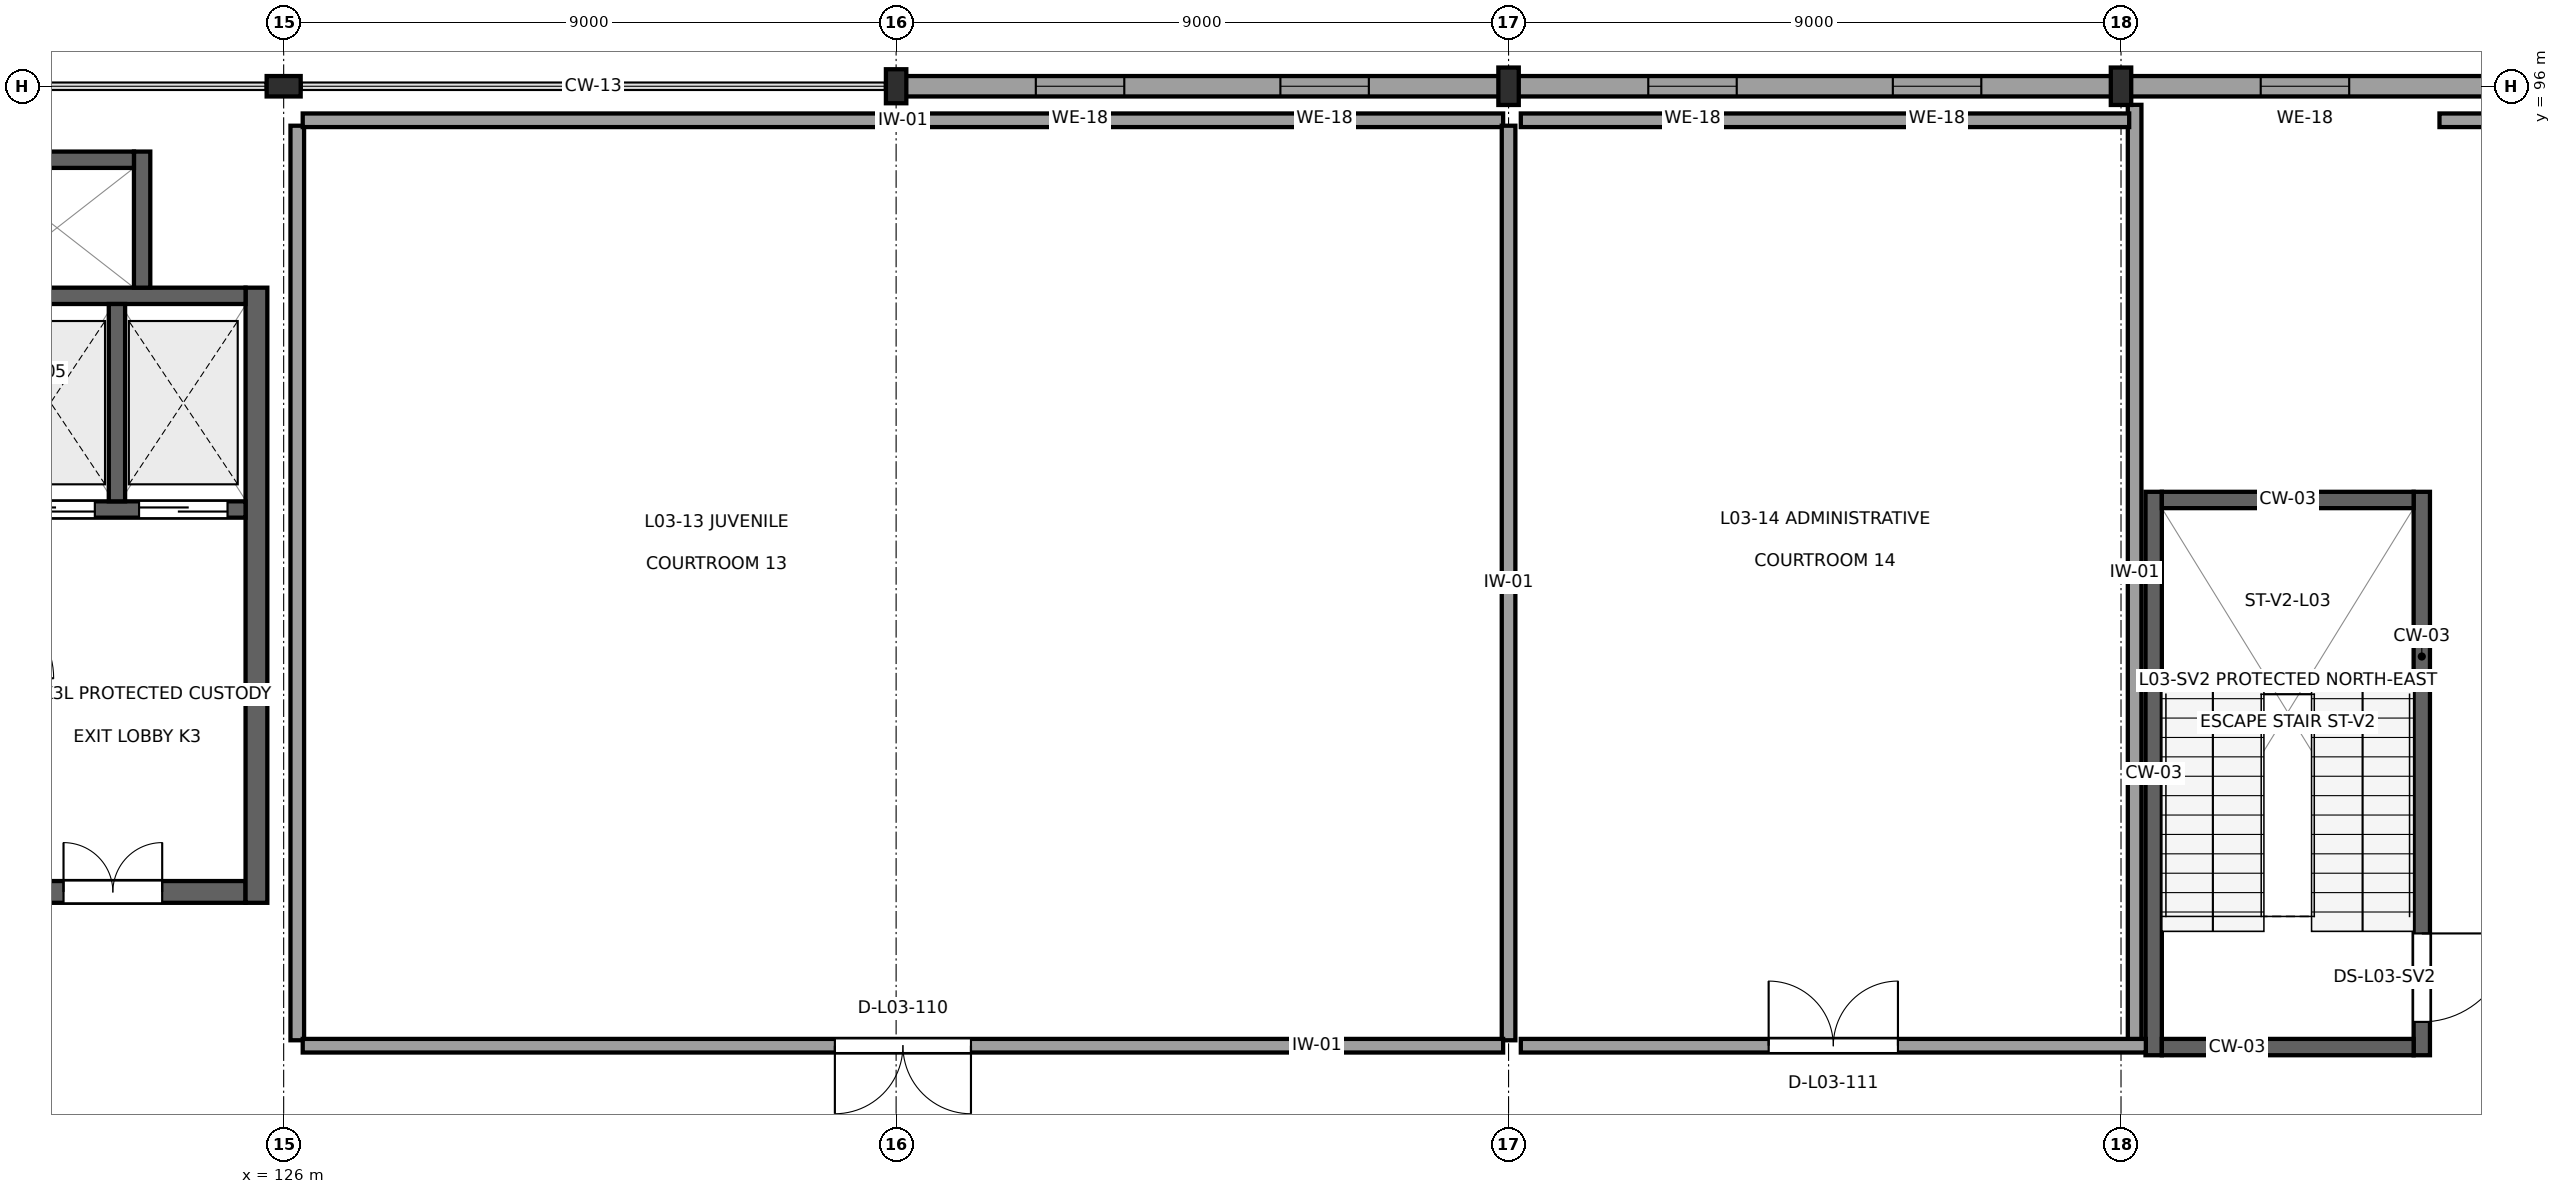
"""IFC4 building model, lengths in metres.
Left out: names, types, materials, properties, quantities, classifications, styles, units other than length and angle.
Written with IfcOpenShell. Run it as: python <this file> out.ifc"""

import sys

from ifc_helpers import new_model, si_unit, direction, frame, frame_2d, origin, origin_2d, place, context, subcontext, project, spatial, rectangle, i_section, extrude, element, fill, save


model = new_model("IFC4")
c1 = context("Model", 3, precision=1e-05, world=origin(), true_north=direction((0.0, 1.0)))
c2 = subcontext(c1, "Body", "Model", "MODEL_VIEW")
j1 = project(units=[si_unit("LENGTHUNIT", "METRE"), si_unit("PLANEANGLEUNIT", "RADIAN")], contexts=[c1])
p1 = place(None, origin())
s1 = spatial("IfcSite", under=j1, at=p1, CompositionType="ELEMENT")
p2 = place(p1, origin())
s2 = spatial("IfcBuilding", under=s1, at=p2, CompositionType="ELEMENT")
p3 = place(p2, frame((0.0, 0.0, 14.4)))
s3 = spatial("IfcBuildingStorey", under=s2, at=p3, CompositionType="ELEMENT", Elevation=14.4)
for number, where, z_axis, x_axis in (
    (1, (126.0, 96.0, 0.0), (0.0, 0.0, 1.0), (0.0, 1.0, 0.0)),
    (2, (135.0, 96.0, 0.0), (0.0, 0.0, 1.0), (1.0, 0.0, 0.0)),
):
    element("IfcColumn", number, at=place(p3, frame(where, z_axis=z_axis, x_axis=x_axis)), inside=s3, PredefinedType="COLUMN", context=c2, shape_type="SweptSolid", body=[
        extrude(i_section(OverallWidth=0.3, OverallDepth=0.5, WebThickness=0.014, FlangeThickness=0.028, at=origin_2d()), origin(), (0.0, 0.0, 1.0), 4.5),
    ])
for number, where, z_axis, x_axis in (
    (3, (144.0, 96.0, 0.0), (0.0, 0.0, 1.0), (1.0, 0.0, 0.0)),
    (4, (153.0, 96.0, 0.0), (0.0, 0.0, 1.0), (1.0, 0.0, 0.0)),
):
    element("IfcColumn", number, at=place(p3, frame(where, z_axis=z_axis, x_axis=x_axis)), inside=s3, PredefinedType="COLUMN", context=c2, shape_type="SweptSolid", body=[
        extrude(i_section(OverallWidth=0.3, OverallDepth=0.55, WebThickness=0.015, FlangeThickness=0.029, at=origin_2d()), origin(), (0.0, 0.0, 1.0), 4.5),
    ])
p4 = place(p3, frame((161.992, 96.0, 0.0), z_axis=(0.0, 0.0, 1.0), x_axis=(-1.0, 0.0, 0.0)))
e5 = element("IfcWall", 5, at=p4, inside=s3, PredefinedType="SOLIDWALL", context=c2, shape_type="SweptSolid", body=[
    extrude(rectangle(XDim=8.984, YDim=0.3, at=frame_2d((4.492, 0.0))), origin(), (0.0, 0.0, 1.0), 3.187),
])
p5 = place(p4, frame((2.045, 0.0, 0.9)))
e6 = element("IfcOpeningElement", 6, at=p5, cuts=e5, PredefinedType="OPENING", context=c2, shape_type="SweptSolid", body=[
    extrude(rectangle(XDim=1.3, YDim=1.3, at=frame_2d((0.65, 0.65))), frame((0.0, 0.165, 0.0), z_axis=(0.0, -1.0, 0.0), x_axis=(1.0, 0.0, 0.0)), (0.0, 0.0, 1.0), 0.33),
])
p6 = place(p4, frame((5.639, 0.0, 0.9)))
e7 = element("IfcOpeningElement", 7, at=p6, cuts=e5, PredefinedType="OPENING", context=c2, shape_type="SweptSolid", body=[
    extrude(rectangle(XDim=1.3, YDim=1.3, at=frame_2d((0.65, 0.65))), frame((0.0, 0.165, 0.0), z_axis=(0.0, -1.0, 0.0), x_axis=(1.0, 0.0, 0.0)), (0.0, 0.0, 1.0), 0.33),
])
p7 = place(p3, frame((152.992, 96.0, 0.0), z_axis=(0.0, 0.0, 1.0), x_axis=(-1.0, 0.0, 0.0)))
e8 = element("IfcWall", 8, at=p7, inside=s3, PredefinedType="SOLIDWALL", context=c2, shape_type="SweptSolid", body=[
    extrude(rectangle(XDim=8.984, YDim=0.3, at=frame_2d((4.492, 0.0))), origin(), (0.0, 0.0, 1.0), 3.187),
])
p8 = place(p7, frame((2.045, 0.0, 0.9)))
e9 = element("IfcOpeningElement", 9, at=p8, cuts=e8, PredefinedType="OPENING", context=c2, shape_type="SweptSolid", body=[
    extrude(rectangle(XDim=1.3, YDim=1.3, at=frame_2d((0.65, 0.65))), frame((0.0, 0.165, 0.0), z_axis=(0.0, -1.0, 0.0), x_axis=(1.0, 0.0, 0.0)), (0.0, 0.0, 1.0), 0.33),
])
p9 = place(p7, frame((5.639, 0.0, 0.9)))
e10 = element("IfcOpeningElement", 10, at=p9, cuts=e8, PredefinedType="OPENING", context=c2, shape_type="SweptSolid", body=[
    extrude(rectangle(XDim=1.3, YDim=1.3, at=frame_2d((0.65, 0.65))), frame((0.0, 0.165, 0.0), z_axis=(0.0, -1.0, 0.0), x_axis=(1.0, 0.0, 0.0)), (0.0, 0.0, 1.0), 0.33),
])
p10 = place(p3, frame((143.992, 96.0, 0.0), z_axis=(0.0, 0.0, 1.0), x_axis=(-1.0, 0.0, 0.0)))
e11 = element("IfcWall", 11, at=p10, inside=s3, PredefinedType="SOLIDWALL", context=c2, shape_type="SweptSolid", body=[
    extrude(rectangle(XDim=8.984, YDim=0.3, at=frame_2d((4.492, 0.0))), origin(), (0.0, 0.0, 1.0), 3.187),
])
p11 = place(p10, frame((2.045, 0.0, 0.9)))
e12 = element("IfcOpeningElement", 12, at=p11, cuts=e11, PredefinedType="OPENING", context=c2, shape_type="SweptSolid", body=[
    extrude(rectangle(XDim=1.3, YDim=1.3, at=frame_2d((0.65, 0.65))), frame((0.0, 0.165, 0.0), z_axis=(0.0, -1.0, 0.0), x_axis=(1.0, 0.0, 0.0)), (0.0, 0.0, 1.0), 0.33),
])
p12 = place(p10, frame((5.639, 0.0, 0.9)))
e13 = element("IfcOpeningElement", 13, at=p12, cuts=e11, PredefinedType="OPENING", context=c2, shape_type="SweptSolid", body=[
    extrude(rectangle(XDim=1.3, YDim=1.3, at=frame_2d((0.65, 0.65))), frame((0.0, 0.165, 0.0), z_axis=(0.0, -1.0, 0.0), x_axis=(1.0, 0.0, 0.0)), (0.0, 0.0, 1.0), 0.33),
])
p13 = place(p3, frame((153.48, 81.76, 0.0), z_axis=(0.0, 0.0, 1.0), x_axis=(0.0, 1.0, 0.0)))
e14 = element("IfcWall", 14, at=p13, inside=s3, PredefinedType="SHEAR", context=c2, shape_type="SweptSolid", body=[
    extrude(rectangle(XDim=8.28, YDim=0.24, at=frame_2d((4.14, 0.0))), origin(), (0.0, 0.0, 1.0), 4.31),
])
p14 = place(p3, frame((157.42, 81.76, 0.0), z_axis=(0.0, 0.0, 1.0), x_axis=(0.0, 1.0, 0.0)))
e15 = element("IfcWall", 15, at=p14, inside=s3, PredefinedType="SHEAR", context=c2, shape_type="SweptSolid", body=[
    extrude(rectangle(XDim=8.28, YDim=0.24, at=frame_2d((4.14, 0.0))), origin(), (0.0, 0.0, 1.0), 4.31),
])
p15 = place(p14, frame((0.49, 0.0, 0.0)))
e16 = element("IfcOpeningElement", 16, at=p15, cuts=e15, PredefinedType="OPENING", context=c2, shape_type="SweptSolid", body=[
    extrude(rectangle(XDim=1.3, YDim=2.2, at=frame_2d((0.65, 1.1))), frame((0.0, 0.135, 0.0), z_axis=(0.0, -1.0, 0.0), x_axis=(1.0, 0.0, 0.0)), (0.0, 0.0, 1.0), 0.27),
])
for number, where, z_axis, x_axis in (
    (17, (153.6, 81.88, 0.0), (0.0, 0.0, 1.0), (1.0, 0.0, 0.0)),
    (18, (153.6, 89.92, 0.0), (0.0, 0.0, 1.0), (1.0, 0.0, 0.0)),
):
    element("IfcWall", number, at=place(p3, frame(where, z_axis=z_axis, x_axis=x_axis)), inside=s3, PredefinedType="SHEAR", context=c2, shape_type="SweptSolid", body=[
        extrude(rectangle(XDim=3.7, YDim=0.24, at=frame_2d((1.85, 0.0))), origin(), (0.0, 0.0, 1.0), 4.31),
    ])
p16 = place(p3, frame((121.54, 84.16, 0.0), z_axis=(0.0, 0.0, 1.0), x_axis=(1.0, 0.0, 0.0)))
e19 = element("IfcWall", 19, at=p16, inside=s3, PredefinedType="SHEAR", context=c2, shape_type="SweptSolid", body=[
    extrude(rectangle(XDim=3.9, YDim=0.32, at=frame_2d((1.95, 0.0))), origin(), (0.0, 0.0, 1.0), 4.16),
])
p17 = place(p16, frame((1.225, 0.0, 0.0)))
e20 = element("IfcOpeningElement", 20, at=p17, cuts=e19, PredefinedType="OPENING", context=c2, shape_type="SweptSolid", body=[
    extrude(rectangle(XDim=1.45, YDim=2.2, at=frame_2d((0.725, 1.1))), frame((0.0, 0.175, 0.0), z_axis=(0.0, -1.0, 0.0), x_axis=(1.0, 0.0, 0.0)), (0.0, 0.0, 1.0), 0.35),
])
p18 = place(p3, frame((125.6, 84.0, 0.0), z_axis=(0.0, 0.0, 1.0), x_axis=(0.0, 1.0, 0.0)))
e21 = element("IfcWall", 21, at=p18, inside=s3, PredefinedType="SHEAR", context=c2, shape_type="SweptSolid", body=[
    extrude(rectangle(XDim=9.04, YDim=0.32, at=frame_2d((4.52, 0.0))), origin(), (0.0, 0.0, 1.0), 4.16),
])
p19 = place(p3, frame((121.54, 89.78, 0.0), z_axis=(0.0, 0.0, 1.0), x_axis=(1.0, 0.0, 0.0)))
e22 = element("IfcWall", 22, at=p19, inside=s3, PredefinedType="SHEAR", context=c2, shape_type="SweptSolid", body=[
    extrude(rectangle(XDim=3.9, YDim=0.24, at=frame_2d((1.95, 0.0))), origin(), (0.0, 0.0, 1.0), 4.31),
])
p20 = place(p19, frame((0.385, 0.0, 0.0)))
e23 = element("IfcOpeningElement", 23, at=p20, cuts=e22, PredefinedType="OPENING", context=c2, shape_type="SweptSolid", body=[
    extrude(rectangle(XDim=1.3, YDim=2.2, at=frame_2d((0.65, 1.1))), frame((0.0, 0.135, 0.0), z_axis=(0.0, -1.0, 0.0), x_axis=(1.0, 0.0, 0.0)), (0.0, 0.0, 1.0), 0.27),
])
p21 = place(p19, frame((2.335, 0.0, 0.0)))
e24 = element("IfcOpeningElement", 24, at=p21, cuts=e22, PredefinedType="OPENING", context=c2, shape_type="SweptSolid", body=[
    extrude(rectangle(XDim=1.3, YDim=2.2, at=frame_2d((0.65, 1.1))), frame((0.0, 0.135, 0.0), z_axis=(0.0, -1.0, 0.0), x_axis=(1.0, 0.0, 0.0)), (0.0, 0.0, 1.0), 0.27),
])
p22 = place(p3, frame((121.54, 92.92, 0.0), z_axis=(0.0, 0.0, 1.0), x_axis=(1.0, 0.0, 0.0)))
e25 = element("IfcWall", 25, at=p22, inside=s3, PredefinedType="SHEAR", context=c2, shape_type="SweptSolid", body=[
    extrude(rectangle(XDim=3.9, YDim=0.24, at=frame_2d((1.95, 0.0))), origin(), (0.0, 0.0, 1.0), 4.31),
])
p23 = place(p3, frame((123.55, 89.9, 0.0), z_axis=(0.0, 0.0, 1.0), x_axis=(0.0, 1.0, 0.0)))
e26 = element("IfcWall", 26, at=p23, inside=s3, PredefinedType="SHEAR", context=c2, shape_type="SweptSolid", body=[
    extrude(rectangle(XDim=2.9, YDim=0.24, at=frame_2d((1.45, 0.0))), origin(), (0.0, 0.0, 1.0), 4.31),
])
p24 = place(p3, frame((123.92, 93.04, 0.0), z_axis=(0.0, 0.0, 1.0), x_axis=(0.0, 1.0, 0.0)))
e27 = element("IfcWall", 27, at=p24, inside=s3, PredefinedType="SHEAR", context=c2, shape_type="SweptSolid", body=[
    extrude(rectangle(XDim=2.0, YDim=0.24, at=frame_2d((1.0, 0.0))), origin(), (0.0, 0.0, 1.0), 4.31),
])
p25 = place(p3, frame((121.54, 94.92, 0.0), z_axis=(0.0, 0.0, 1.0), x_axis=(1.0, 0.0, 0.0)))
e28 = element("IfcWall", 28, at=p25, inside=s3, PredefinedType="SHEAR", context=c2, shape_type="SweptSolid", body=[
    extrude(rectangle(XDim=2.26, YDim=0.24, at=frame_2d((1.13, 0.0))), origin(), (0.0, 0.0, 1.0), 4.31),
])
p26 = place(p3, frame((126.2, 81.98, 0.0), z_axis=(0.0, 0.0, 1.0), x_axis=(0.0, 1.0, 0.0)))
e29 = element("IfcWall", 29, at=p26, inside=s3, PredefinedType="PARTITIONING", context=c2, shape_type="SweptSolid", body=[
    extrude(rectangle(XDim=13.44, YDim=0.2, at=frame_2d((6.72, 0.0))), origin(), (0.0, 0.0, 1.0), 3.405),
])
p27 = place(p3, frame((126.28, 95.5, 0.0), z_axis=(0.0, 0.0, 1.0), x_axis=(1.0, 0.0, 0.0)))
e30 = element("IfcWall", 30, at=p27, inside=s3, PredefinedType="PARTITIONING", context=c2, shape_type="SweptSolid", body=[
    extrude(rectangle(XDim=17.64, YDim=0.2, at=frame_2d((8.82, 0.0))), origin(), (0.0, 0.0, 1.0), 4.14),
])
p28 = place(p3, frame((144.0, 95.42, 0.0), z_axis=(0.0, 0.0, 1.0), x_axis=(0.0, -1.0, 0.0)))
e31 = element("IfcWall", 31, at=p28, inside=s3, PredefinedType="PARTITIONING", context=c2, shape_type="SweptSolid", body=[
    extrude(rectangle(XDim=13.44, YDim=0.2, at=frame_2d((6.72, 0.0))), origin(), (0.0, 0.0, 1.0), 3.545),
])
p29 = place(p3, frame((143.92, 81.9, 0.0), z_axis=(0.0, 0.0, 1.0), x_axis=(-1.0, 0.0, 0.0)))
e32 = element("IfcWall", 32, at=p29, inside=s3, PredefinedType="PARTITIONING", context=c2, shape_type="SweptSolid", body=[
    extrude(rectangle(XDim=17.64, YDim=0.2, at=frame_2d((8.82, 0.0))), origin(), (0.0, 0.0, 1.0), 4.14),
])
p30 = place(p29, frame((7.82, 0.0, 0.0)))
e33 = element("IfcOpeningElement", 33, at=p30, cuts=e32, PredefinedType="OPENING", context=c2, shape_type="SweptSolid", body=[
    extrude(rectangle(XDim=2.0, YDim=2.6, at=frame_2d((1.0, 1.3))), frame((0.0, 0.115, 0.0), z_axis=(0.0, -1.0, 0.0), x_axis=(1.0, 0.0, 0.0)), (0.0, 0.0, 1.0), 0.23),
])
p31 = place(p3, frame((153.2, 95.727, 0.0), z_axis=(0.0, 0.0, 1.0), x_axis=(0.0, -1.0, 0.0)))
e34 = element("IfcWall", 34, at=p31, inside=s3, PredefinedType="PARTITIONING", context=c2, shape_type="SweptSolid", body=[
    extrude(rectangle(XDim=13.747, YDim=0.2, at=frame_2d((6.874, 0.0))), origin(), (0.0, 0.0, 1.0), 3.495),
])
p32 = place(p3, frame((153.365, 81.9, 0.0), z_axis=(0.0, 0.0, 1.0), x_axis=(-1.0, 0.0, 0.0)))
e35 = element("IfcWall", 35, at=p32, inside=s3, PredefinedType="PARTITIONING", context=c2, shape_type="SweptSolid", body=[
    extrude(rectangle(XDim=9.185, YDim=0.2, at=frame_2d((4.593, 0.0))), origin(), (0.0, 0.0, 1.0), 4.14),
])
p33 = place(p32, frame((3.643, 0.0, 0.0)))
e36 = element("IfcOpeningElement", 36, at=p33, cuts=e35, PredefinedType="OPENING", context=c2, shape_type="SweptSolid", body=[
    extrude(rectangle(XDim=1.9, YDim=2.5, at=frame_2d((0.95, 1.25))), frame((0.0, 0.115, 0.0), z_axis=(0.0, -1.0, 0.0), x_axis=(1.0, 0.0, 0.0)), (0.0, 0.0, 1.0), 0.23),
])
p34 = place(p3, frame((144.18, 95.5, 0.0), z_axis=(0.0, 0.0, 1.0), x_axis=(1.0, 0.0, 0.0)))
e37 = element("IfcWall", 37, at=p34, inside=s3, PredefinedType="PARTITIONING", context=c2, shape_type="SweptSolid", body=[
    extrude(rectangle(XDim=8.94, YDim=0.2, at=frame_2d((4.47, 0.0))), origin(), (0.0, 0.0, 1.0), 4.14),
])
p35 = place(p3, frame((157.68, 95.5, 0.0), z_axis=(0.0, 0.0, 1.0), x_axis=(1.0, 0.0, 0.0)))
e38 = element("IfcWall", 38, at=p35, inside=s3, PredefinedType="PARTITIONING", context=c2, shape_type="SweptSolid", body=[
    extrude(rectangle(XDim=16.34, YDim=0.2, at=frame_2d((8.17, 0.0))), origin(), (0.0, 0.0, 1.0), 4.14),
])
p36 = place(p6, origin())
e39 = element("IfcWindow", 39, at=p36, inside=s3, PartitioningType="SINGLE_PANEL", PredefinedType="WINDOW", context=c2, shape_type="SweptSolid", body=[
    extrude(rectangle(XDim=1.3, YDim=1.3, at=frame_2d((0.65, 0.65))), frame((0.0, 0.03, 0.0), z_axis=(0.0, -1.0, 0.0), x_axis=(1.0, 0.0, 0.0)), (0.0, 0.0, 1.0), 0.06),
])
fill(e7, e39)
p37 = place(p8, origin())
e40 = element("IfcWindow", 40, at=p37, inside=s3, PartitioningType="SINGLE_PANEL", PredefinedType="WINDOW", context=c2, shape_type="SweptSolid", body=[
    extrude(rectangle(XDim=1.3, YDim=1.3, at=frame_2d((0.65, 0.65))), frame((0.0, 0.03, 0.0), z_axis=(0.0, -1.0, 0.0), x_axis=(1.0, 0.0, 0.0)), (0.0, 0.0, 1.0), 0.06),
])
fill(e9, e40)
p38 = place(p9, origin())
e41 = element("IfcWindow", 41, at=p38, inside=s3, PartitioningType="SINGLE_PANEL", PredefinedType="WINDOW", context=c2, shape_type="SweptSolid", body=[
    extrude(rectangle(XDim=1.3, YDim=1.3, at=frame_2d((0.65, 0.65))), frame((0.0, 0.03, 0.0), z_axis=(0.0, -1.0, 0.0), x_axis=(1.0, 0.0, 0.0)), (0.0, 0.0, 1.0), 0.06),
])
fill(e10, e41)
p39 = place(p11, origin())
e42 = element("IfcWindow", 42, at=p39, inside=s3, PartitioningType="SINGLE_PANEL", PredefinedType="WINDOW", context=c2, shape_type="SweptSolid", body=[
    extrude(rectangle(XDim=1.3, YDim=1.3, at=frame_2d((0.65, 0.65))), frame((0.0, 0.03, 0.0), z_axis=(0.0, -1.0, 0.0), x_axis=(1.0, 0.0, 0.0)), (0.0, 0.0, 1.0), 0.06),
])
fill(e12, e42)
p40 = place(p12, origin())
e43 = element("IfcWindow", 43, at=p40, inside=s3, PartitioningType="SINGLE_PANEL", PredefinedType="WINDOW", context=c2, shape_type="SweptSolid", body=[
    extrude(rectangle(XDim=1.3, YDim=1.3, at=frame_2d((0.65, 0.65))), frame((0.0, 0.03, 0.0), z_axis=(0.0, -1.0, 0.0), x_axis=(1.0, 0.0, 0.0)), (0.0, 0.0, 1.0), 0.06),
])
fill(e13, e43)
p41 = place(p15, frame((1.3, 0.0, 0.0), z_axis=(0.0, 0.0, 1.0), x_axis=(-1.0, 0.0, 0.0)))
e44 = element("IfcDoor", 44, at=p41, inside=s3, OperationType="SINGLE_SWING_RIGHT", PredefinedType="DOOR", context=c2, shape_type="SweptSolid", body=[
    extrude(rectangle(XDim=1.3, YDim=2.2, at=frame_2d((0.65, 1.1))), frame((0.0, 0.025, 0.0), z_axis=(0.0, -1.0, 0.0), x_axis=(1.0, 0.0, 0.0)), (0.0, 0.0, 1.0), 0.05),
])
fill(e16, e44)
p42 = place(p17, origin())
e45 = element("IfcDoor", 45, at=p42, inside=s3, OperationType="DOUBLE_DOOR_SINGLE_SWING", PredefinedType="DOOR", context=c2, shape_type="SweptSolid", body=[
    extrude(rectangle(XDim=1.45, YDim=2.2, at=frame_2d((0.725, 1.1))), frame((0.0, 0.025, 0.0), z_axis=(0.0, -1.0, 0.0), x_axis=(1.0, 0.0, 0.0)), (0.0, 0.0, 1.0), 0.05),
])
fill(e20, e45)
p43 = place(p20, origin())
e46 = element("IfcDoor", 46, at=p43, inside=s3, OperationType="DOUBLE_DOOR_SLIDING", PredefinedType="DOOR", context=c2, shape_type="SweptSolid", body=[
    extrude(rectangle(XDim=1.3, YDim=2.2, at=frame_2d((0.65, 1.1))), frame((0.0, 0.025, 0.0), z_axis=(0.0, -1.0, 0.0), x_axis=(1.0, 0.0, 0.0)), (0.0, 0.0, 1.0), 0.05),
])
fill(e23, e46)
p44 = place(p21, origin())
e47 = element("IfcDoor", 47, at=p44, inside=s3, OperationType="DOUBLE_DOOR_SLIDING", PredefinedType="DOOR", context=c2, shape_type="SweptSolid", body=[
    extrude(rectangle(XDim=1.3, YDim=2.2, at=frame_2d((0.65, 1.1))), frame((0.0, 0.025, 0.0), z_axis=(0.0, -1.0, 0.0), x_axis=(1.0, 0.0, 0.0)), (0.0, 0.0, 1.0), 0.05),
])
fill(e24, e47)
p45 = place(p30, origin())
e48 = element("IfcDoor", 48, at=p45, inside=s3, OperationType="DOUBLE_DOOR_SINGLE_SWING", PredefinedType="DOOR", context=c2, shape_type="SweptSolid", body=[
    extrude(rectangle(XDim=2.0, YDim=2.6, at=frame_2d((1.0, 1.3))), frame((0.0, 0.025, 0.0), z_axis=(0.0, -1.0, 0.0), x_axis=(1.0, 0.0, 0.0)), (0.0, 0.0, 1.0), 0.05),
])
fill(e33, e48)
p46 = place(p33, frame((1.9, 0.0, 0.0), z_axis=(0.0, 0.0, 1.0), x_axis=(-1.0, 0.0, 0.0)))
e49 = element("IfcDoor", 49, at=p46, inside=s3, OperationType="DOUBLE_DOOR_SINGLE_SWING", PredefinedType="DOOR", context=c2, shape_type="SweptSolid", body=[
    extrude(rectangle(XDim=1.9, YDim=2.5, at=frame_2d((0.95, 1.25))), frame((0.0, 0.025, 0.0), z_axis=(0.0, -1.0, 0.0), x_axis=(1.0, 0.0, 0.0)), (0.0, 0.0, 1.0), 0.05),
])
fill(e36, e49)
save(model, sys.argv[1])
